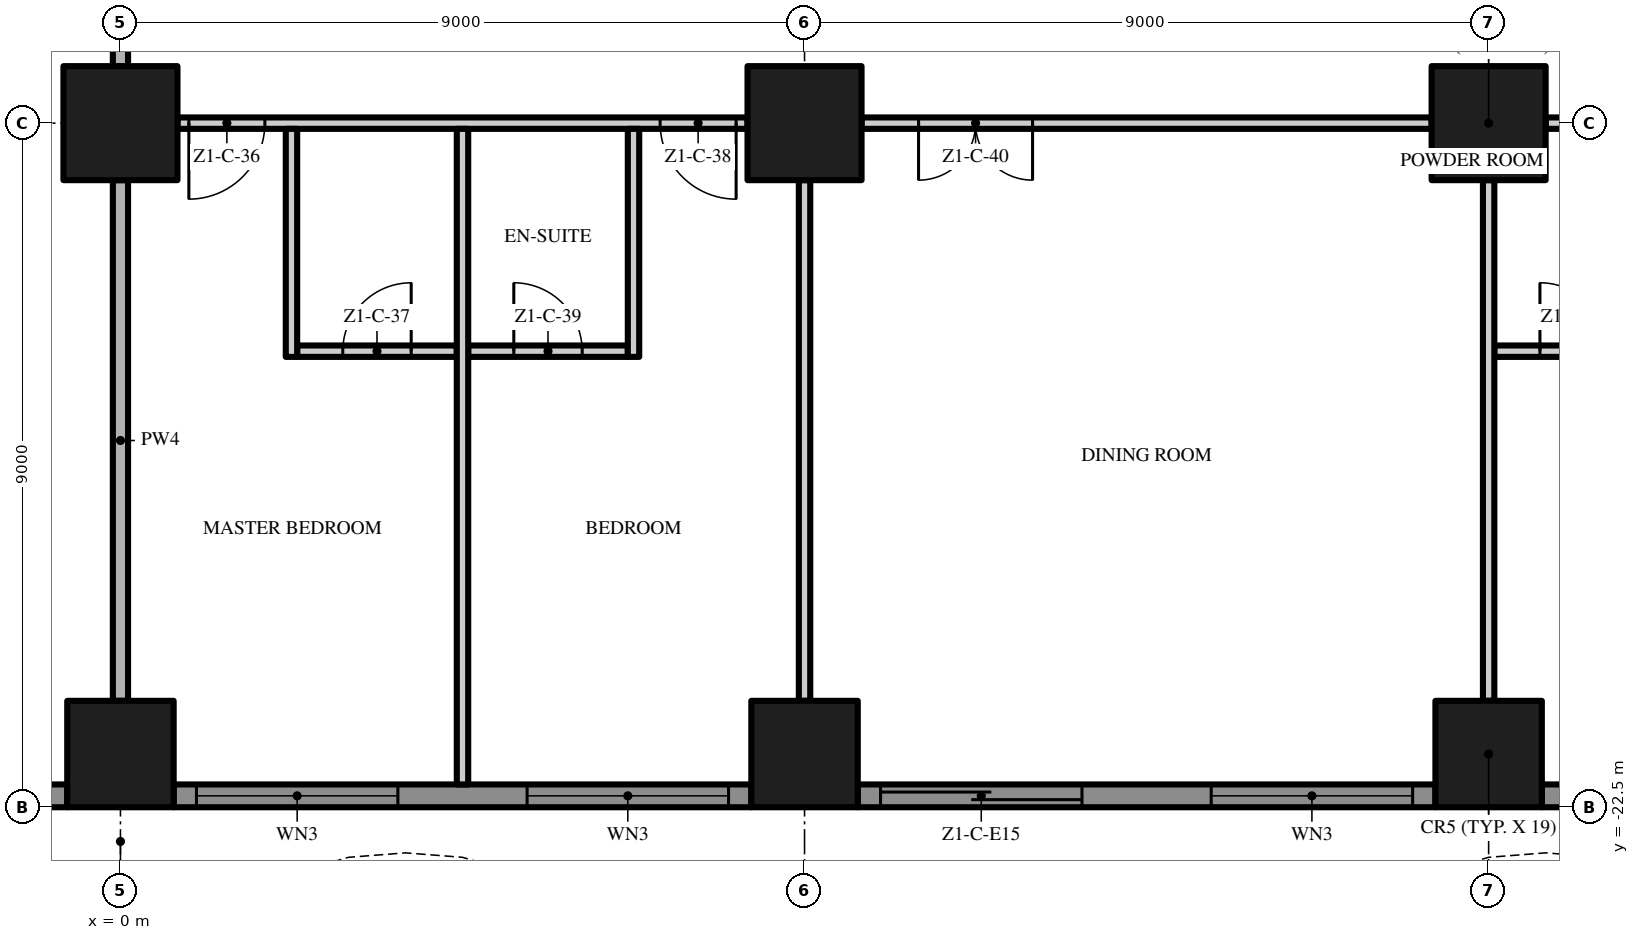
"""IFC4 building model, lengths in metres.
Left out: names, types, materials, properties, quantities, classifications, styles, units other than length and angle.
Written with IfcOpenShell. Run it as: python <this file> out.ifc"""

import sys

from ifc_helpers import new_model, si_unit, direction, frame, frame_2d, origin, origin_2d, place, context, subcontext, project, spatial, polyline, rectangle, outline, extrude, element, fill, save


model = new_model("IFC4")
c1 = context("Model", 3, precision=1e-05, world=origin(), true_north=direction((0.0, 1.0)))
c2 = subcontext(c1, "Body", "Model", "MODEL_VIEW")
j1 = project(units=[si_unit("LENGTHUNIT", "METRE"), si_unit("PLANEANGLEUNIT", "RADIAN")], contexts=[c1])
p1 = place(None, origin())
s1 = spatial("IfcSite", under=j1, at=p1, CompositionType="ELEMENT")
p2 = place(p1, origin())
s2 = spatial("IfcBuilding", under=s1, at=p2, CompositionType="ELEMENT")
p3 = place(p2, frame((0.0, 0.0, 45.4)))
s3 = spatial("IfcBuildingStorey", under=s2, at=p3, CompositionType="ELEMENT", Elevation=45.4)
p4 = place(p3, frame((0.0, -13.5, 0.0), z_axis=(0.0, 0.0, 1.0), x_axis=(1.0, 0.0, 0.0)))
e1 = element("IfcColumn", 1, at=p4, inside=s3, PredefinedType="COLUMN", context=c2, shape_type="SweptSolid", body=[
    extrude(rectangle(XDim=1.5, YDim=1.5, at=origin_2d()), origin(), (0.0, 0.0, 1.0), 3.5),
])
p5 = place(p3, frame((0.0, -21.8, 0.0), z_axis=(0.0, 0.0, 1.0), x_axis=(1.0, 0.0, 0.0)))
e2 = element("IfcColumn", 2, at=p5, inside=s3, PredefinedType="COLUMN", context=c2, shape_type="SweptSolid", body=[
    extrude(rectangle(XDim=1.4, YDim=1.4, at=origin_2d()), origin(), (0.0, 0.0, 1.0), 3.5),
])
p6 = place(p3, frame((18.0, -13.5, 0.0), z_axis=(0.0, 0.0, 1.0), x_axis=(1.0, 0.0, 0.0)))
e3 = element("IfcColumn", 3, at=p6, inside=s3, PredefinedType="COLUMN", context=c2, shape_type="SweptSolid", body=[
    extrude(rectangle(XDim=1.5, YDim=1.5, at=origin_2d()), origin(), (0.0, 0.0, 1.0), 3.5),
])
p7 = place(p3, frame((18.0, -21.8, 0.0), z_axis=(0.0, 0.0, 1.0), x_axis=(1.0, 0.0, 0.0)))
e4 = element("IfcColumn", 4, at=p7, inside=s3, PredefinedType="COLUMN", context=c2, shape_type="SweptSolid", body=[
    extrude(rectangle(XDim=1.4, YDim=1.4, at=origin_2d()), origin(), (0.0, 0.0, 1.0), 3.5),
])
p8 = place(p3, frame((9.0, -13.5, 0.0), z_axis=(0.0, 0.0, 1.0), x_axis=(1.0, 0.0, 0.0)))
e5 = element("IfcColumn", 5, at=p8, inside=s3, PredefinedType="COLUMN", context=c2, shape_type="SweptSolid", body=[
    extrude(rectangle(XDim=1.5, YDim=1.5, at=origin_2d()), origin(), (0.0, 0.0, 1.0), 3.5),
])
p9 = place(p3, frame((9.0, -21.8, 0.0), z_axis=(0.0, 0.0, 1.0), x_axis=(1.0, 0.0, 0.0)))
e6 = element("IfcColumn", 6, at=p9, inside=s3, PredefinedType="COLUMN", context=c2, shape_type="SweptSolid", body=[
    extrude(rectangle(XDim=1.4, YDim=1.4, at=origin_2d()), origin(), (0.0, 0.0, 1.0), 3.5),
])
p10 = place(p3, frame((-0.7, -22.35, 0.0), z_axis=(0.0, 0.0, 1.0), x_axis=(-1.0, 0.0, 0.0)))
e7 = element("IfcWall", 7, at=p10, inside=s3, PredefinedType="SOLIDWALL", context=c2, shape_type="SweptSolid", body=[
    extrude(rectangle(XDim=7.6, YDim=0.3, at=frame_2d((3.8, 0.0))), origin(), (0.0, 0.0, 1.0), 3.5),
])
p11 = place(p10, frame((4.65, 0.0, 0.45)))
e8 = element("IfcOpeningElement", 8, at=p11, cuts=e7, PredefinedType="OPENING", context=c2, shape_type="SweptSolid", body=[
    extrude(rectangle(XDim=2.65, YDim=2.65, at=frame_2d((1.325, 1.325))), frame((0.0, 0.16, 0.0), z_axis=(0.0, -1.0, 0.0), x_axis=(1.0, 0.0, 0.0)), (0.0, 0.0, 1.0), 0.32),
])
p12 = place(p10, frame((0.3, 0.0, 0.0)))
e9 = element("IfcOpeningElement", 9, at=p12, cuts=e7, PredefinedType="OPENING", context=c2, shape_type="SweptSolid", body=[
    extrude(rectangle(XDim=2.65, YDim=2.4, at=frame_2d((1.325, 1.2))), frame((0.0, 0.16, 0.0), z_axis=(0.0, -1.0, 0.0), x_axis=(1.0, 0.0, 0.0)), (0.0, 0.0, 1.0), 0.32),
])
p13 = place(p3, frame((8.3, -22.35, 0.0), z_axis=(0.0, 0.0, 1.0), x_axis=(-1.0, 0.0, 0.0)))
e10 = element("IfcWall", 10, at=p13, inside=s3, PredefinedType="SOLIDWALL", context=c2, shape_type="SweptSolid", body=[
    extrude(rectangle(XDim=7.6, YDim=0.3, at=frame_2d((3.8, 0.0))), origin(), (0.0, 0.0, 1.0), 3.5),
])
p14 = place(p13, frame((4.65, 0.0, 0.45)))
e11 = element("IfcOpeningElement", 11, at=p14, cuts=e10, PredefinedType="OPENING", context=c2, shape_type="SweptSolid", body=[
    extrude(rectangle(XDim=2.65, YDim=2.65, at=frame_2d((1.325, 1.325))), frame((0.0, 0.16, 0.0), z_axis=(0.0, -1.0, 0.0), x_axis=(1.0, 0.0, 0.0)), (0.0, 0.0, 1.0), 0.32),
])
p15 = place(p13, frame((0.3, 0.0, 0.45)))
e12 = element("IfcOpeningElement", 12, at=p15, cuts=e10, PredefinedType="OPENING", context=c2, shape_type="SweptSolid", body=[
    extrude(rectangle(XDim=2.65, YDim=2.65, at=frame_2d((1.325, 1.325))), frame((0.0, 0.16, 0.0), z_axis=(0.0, -1.0, 0.0), x_axis=(1.0, 0.0, 0.0)), (0.0, 0.0, 1.0), 0.32),
])
p16 = place(p3, frame((17.3, -22.35, 0.0), z_axis=(0.0, 0.0, 1.0), x_axis=(-1.0, 0.0, 0.0)))
e13 = element("IfcWall", 13, at=p16, inside=s3, PredefinedType="SOLIDWALL", context=c2, shape_type="SweptSolid", body=[
    extrude(rectangle(XDim=7.6, YDim=0.3, at=frame_2d((3.8, 0.0))), origin(), (0.0, 0.0, 1.0), 3.5),
])
p17 = place(p16, frame((4.65, 0.0, 0.0)))
e14 = element("IfcOpeningElement", 14, at=p17, cuts=e13, PredefinedType="OPENING", context=c2, shape_type="SweptSolid", body=[
    extrude(rectangle(XDim=2.65, YDim=2.4, at=frame_2d((1.325, 1.2))), frame((0.0, 0.16, 0.0), z_axis=(0.0, -1.0, 0.0), x_axis=(1.0, 0.0, 0.0)), (0.0, 0.0, 1.0), 0.32),
])
p18 = place(p16, frame((0.3, 0.0, 0.45)))
e15 = element("IfcOpeningElement", 15, at=p18, cuts=e13, PredefinedType="OPENING", context=c2, shape_type="SweptSolid", body=[
    extrude(rectangle(XDim=2.65, YDim=2.65, at=frame_2d((1.325, 1.325))), frame((0.0, 0.16, 0.0), z_axis=(0.0, -1.0, 0.0), x_axis=(1.0, 0.0, 0.0)), (0.0, 0.0, 1.0), 0.32),
])
p19 = place(p3, frame((22.5, -22.35, 0.0), z_axis=(0.0, 0.0, 1.0), x_axis=(-1.0, 0.0, 0.0)))
e16 = element("IfcWall", 16, at=p19, inside=s3, PredefinedType="SOLIDWALL", context=c2, shape_type="SweptSolid", body=[
    extrude(rectangle(XDim=3.8, YDim=0.3, at=frame_2d((1.9, 0.0))), origin(), (0.0, 0.0, 1.0), 3.5),
])
p20 = place(p19, frame((0.85, 0.0, 0.45)))
e17 = element("IfcOpeningElement", 17, at=p20, cuts=e16, PredefinedType="OPENING", context=c2, shape_type="SweptSolid", body=[
    extrude(rectangle(XDim=2.65, YDim=2.65, at=frame_2d((1.325, 1.325))), frame((0.0, 0.16, 0.0), z_axis=(0.0, -1.0, 0.0), x_axis=(1.0, 0.0, 0.0)), (0.0, 0.0, 1.0), 0.32),
])
p21 = place(p3, origin())
e18 = element("IfcWall", 18, at=p21, inside=s3, PredefinedType="USERDEFINED", context=c2, shape_type="SweptSolid", body=[
    extrude(outline(polyline([(-22.5, -24.3), (-21.0, -25.005), (-19.5, -25.441), (-18.75, -25.5), (-18.0, -25.441), (-16.5, -25.005), (-15.0, -24.3), (-13.5, -23.595), (-12.0, -23.159), (-11.25, -23.1), (-10.5, -23.159), (-9.0, -23.595), (-7.5, -24.3), (-6.0, -25.005), (-4.5, -25.441), (-3.75, -25.5), (-3.0, -25.441), (-1.5, -25.005), (0.0, -24.3), (1.5, -23.595), (3.0, -23.159), (3.75, -23.1), (4.5, -23.159), (6.0, -23.595), (7.5, -24.3), (9.0, -25.005), (10.5, -25.441), (11.25, -25.5), (12.0, -25.441), (13.5, -25.005), (15.0, -24.3), (16.5, -23.595), (18.0, -23.159), (18.75, -23.1), (19.5, -23.159), (21.0, -23.595), (22.5, -24.3), (22.606, -24.074), (21.089, -23.36), (19.545, -22.911), (18.75, -22.849), (17.955, -22.911), (16.411, -23.36), (14.894, -24.074), (13.411, -24.771), (11.955, -25.194), (11.25, -25.249), (10.545, -25.194), (9.089, -24.771), (7.606, -24.074), (6.089, -23.36), (4.545, -22.911), (3.75, -22.849), (2.955, -22.911), (1.411, -23.36), (-0.106, -24.074), (-1.589, -24.771), (-3.045, -25.194), (-3.75, -25.249), (-4.455, -25.194), (-5.911, -24.771), (-7.394, -24.074), (-8.911, -23.36), (-10.455, -22.911), (-11.25, -22.849), (-12.045, -22.911), (-13.589, -23.36), (-15.106, -24.074), (-16.589, -24.771), (-18.045, -25.194), (-18.75, -25.249), (-19.455, -25.194), (-20.911, -24.771), (-22.394, -24.074), (-22.5, -24.3)])), origin(), (0.0, 0.0, 1.0), 0.9),
])
p22 = place(p3, frame((2.325, -16.5, 0.0), z_axis=(0.0, 0.0, 1.0), x_axis=(1.0, 0.0, 0.0)))
e19 = element("IfcWall", 19, at=p22, inside=s3, PredefinedType="PARTITIONING", context=c2, shape_type="SweptSolid", body=[
    extrude(rectangle(XDim=2.1, YDim=0.15, at=frame_2d((1.05, 0.0))), origin(), (0.0, 0.0, 1.0), 3.5),
])
p23 = place(p22, frame((0.6, 0.0, 0.0)))
e20 = element("IfcOpeningElement", 20, at=p23, cuts=e19, PredefinedType="OPENING", context=c2, shape_type="SweptSolid", body=[
    extrude(rectangle(XDim=0.9, YDim=2.1, at=frame_2d((0.45, 1.05))), frame((0.0, 0.085, 0.0), z_axis=(0.0, -1.0, 0.0), x_axis=(1.0, 0.0, 0.0)), (0.0, 0.0, 1.0), 0.17),
])
p24 = place(p3, frame((4.575, -16.5, 0.0), z_axis=(0.0, 0.0, 1.0), x_axis=(1.0, 0.0, 0.0)))
e21 = element("IfcWall", 21, at=p24, inside=s3, PredefinedType="PARTITIONING", context=c2, shape_type="SweptSolid", body=[
    extrude(rectangle(XDim=2.1, YDim=0.15, at=frame_2d((1.05, 0.0))), origin(), (0.0, 0.0, 1.0), 3.5),
])
p25 = place(p24, frame((0.6, 0.0, 0.0)))
e22 = element("IfcOpeningElement", 22, at=p25, cuts=e21, PredefinedType="OPENING", context=c2, shape_type="SweptSolid", body=[
    extrude(rectangle(XDim=0.9, YDim=2.1, at=frame_2d((0.45, 1.05))), frame((0.0, 0.085, 0.0), z_axis=(0.0, -1.0, 0.0), x_axis=(1.0, 0.0, 0.0)), (0.0, 0.0, 1.0), 0.17),
])
p26 = place(p3, frame((18.075, -16.5, 0.0), z_axis=(0.0, 0.0, 1.0), x_axis=(1.0, 0.0, 0.0)))
e23 = element("IfcWall", 23, at=p26, inside=s3, PredefinedType="PARTITIONING", context=c2, shape_type="SweptSolid", body=[
    extrude(rectangle(XDim=2.1, YDim=0.15, at=frame_2d((1.05, 0.0))), origin(), (0.0, 0.0, 1.0), 3.5),
])
p27 = place(p26, frame((0.6, 0.0, 0.0)))
e24 = element("IfcOpeningElement", 24, at=p27, cuts=e23, PredefinedType="OPENING", context=c2, shape_type="SweptSolid", body=[
    extrude(rectangle(XDim=0.9, YDim=2.1, at=frame_2d((0.45, 1.05))), frame((0.0, 0.085, 0.0), z_axis=(0.0, -1.0, 0.0), x_axis=(1.0, 0.0, 0.0)), (0.0, 0.0, 1.0), 0.17),
])
p28 = place(p3, frame((8.25, -13.5, 0.0), z_axis=(0.0, 0.0, 1.0), x_axis=(-1.0, 0.0, 0.0)))
e25 = element("IfcWall", 25, at=p28, inside=s3, PredefinedType="PARTITIONING", context=c2, shape_type="SweptSolid", body=[
    extrude(rectangle(XDim=7.5, YDim=0.15, at=frame_2d((3.75, 0.0))), origin(), (0.0, 0.0, 1.0), 3.5),
])
p29 = place(p28, frame((6.35, 0.0, 0.0)))
e26 = element("IfcOpeningElement", 26, at=p29, cuts=e25, PredefinedType="OPENING", context=c2, shape_type="SweptSolid", body=[
    extrude(rectangle(XDim=1.0, YDim=2.4, at=frame_2d((0.5, 1.2))), frame((0.0, 0.085, 0.0), z_axis=(0.0, -1.0, 0.0), x_axis=(1.0, 0.0, 0.0)), (0.0, 0.0, 1.0), 0.17),
])
p30 = place(p28, frame((0.15, 0.0, 0.0)))
e27 = element("IfcOpeningElement", 27, at=p30, cuts=e25, PredefinedType="OPENING", context=c2, shape_type="SweptSolid", body=[
    extrude(rectangle(XDim=1.0, YDim=2.4, at=frame_2d((0.5, 1.2))), frame((0.0, 0.085, 0.0), z_axis=(0.0, -1.0, 0.0), x_axis=(1.0, 0.0, 0.0)), (0.0, 0.0, 1.0), 0.17),
])
p31 = place(p3, frame((17.25, -13.5, 0.0), z_axis=(0.0, 0.0, 1.0), x_axis=(-1.0, 0.0, 0.0)))
e28 = element("IfcWall", 28, at=p31, inside=s3, PredefinedType="PARTITIONING", context=c2, shape_type="SweptSolid", body=[
    extrude(rectangle(XDim=7.5, YDim=0.15, at=frame_2d((3.75, 0.0))), origin(), (0.0, 0.0, 1.0), 3.5),
])
p32 = place(p31, frame((5.25, 0.0, 0.0)))
e29 = element("IfcOpeningElement", 29, at=p32, cuts=e28, PredefinedType="OPENING", context=c2, shape_type="SweptSolid", body=[
    extrude(rectangle(XDim=1.5, YDim=2.4, at=frame_2d((0.75, 1.2))), frame((0.0, 0.085, 0.0), z_axis=(0.0, -1.0, 0.0), x_axis=(1.0, 0.0, 0.0)), (0.0, 0.0, 1.0), 0.17),
])
p33 = place(p3, frame((25.6, -13.5, 0.0), z_axis=(0.0, 0.0, 1.0), x_axis=(-1.0, 0.0, 0.0)))
e30 = element("IfcWall", 30, at=p33, inside=s3, PredefinedType="PARTITIONING", context=c2, shape_type="SweptSolid", body=[
    extrude(rectangle(XDim=6.85, YDim=0.15, at=frame_2d((3.425, 0.0))), origin(), (0.0, 0.0, 1.0), 3.5),
])
p34 = place(p33, frame((1.1, 0.0, 0.0)))
e31 = element("IfcOpeningElement", 31, at=p34, cuts=e30, PredefinedType="OPENING", context=c2, shape_type="SweptSolid", body=[
    extrude(rectangle(XDim=1.8, YDim=2.4, at=frame_2d((0.9, 1.2))), frame((0.0, 0.085, 0.0), z_axis=(0.0, -1.0, 0.0), x_axis=(1.0, 0.0, 0.0)), (0.0, 0.0, 1.0), 0.17),
])
p35 = place(p3, frame((0.0, -21.1, 0.0), z_axis=(0.0, 0.0, 1.0), x_axis=(0.0, 1.0, 0.0)))
e32 = element("IfcWall", 32, at=p35, inside=s3, PredefinedType="PARTITIONING", context=c2, shape_type="SweptSolid", body=[
    extrude(rectangle(XDim=6.85, YDim=0.2, at=frame_2d((3.425, 0.0))), origin(), (0.0, 0.0, 1.0), 3.5),
])
p36 = place(p3, frame((0.0, -12.75, 0.0), z_axis=(0.0, 0.0, 1.0), x_axis=(0.0, 1.0, 0.0)))
e33 = element("IfcWall", 33, at=p36, inside=s3, PredefinedType="PARTITIONING", context=c2, shape_type="SweptSolid", body=[
    extrude(rectangle(XDim=7.5, YDim=0.2, at=frame_2d((3.75, 0.0))), origin(), (0.0, 0.0, 1.0), 3.5),
])
p37 = place(p3, frame((2.25, -16.575, 0.0), z_axis=(0.0, 0.0, 1.0), x_axis=(0.0, 1.0, 0.0)))
e34 = element("IfcWall", 34, at=p37, inside=s3, PredefinedType="PARTITIONING", context=c2, shape_type="SweptSolid", body=[
    extrude(rectangle(XDim=3.0, YDim=0.15, at=frame_2d((1.5, 0.0))), origin(), (0.0, 0.0, 1.0), 3.5),
])
p38 = place(p3, frame((4.5, -22.2, 0.0), z_axis=(0.0, 0.0, 1.0), x_axis=(0.0, 1.0, 0.0)))
e35 = element("IfcWall", 35, at=p38, inside=s3, PredefinedType="PARTITIONING", context=c2, shape_type="SweptSolid", body=[
    extrude(rectangle(XDim=8.625, YDim=0.15, at=frame_2d((4.312, 0.0))), origin(), (0.0, 0.0, 1.0), 3.5),
])
p39 = place(p3, frame((6.75, -16.575, 0.0), z_axis=(0.0, 0.0, 1.0), x_axis=(0.0, 1.0, 0.0)))
e36 = element("IfcWall", 36, at=p39, inside=s3, PredefinedType="PARTITIONING", context=c2, shape_type="SweptSolid", body=[
    extrude(rectangle(XDim=3.0, YDim=0.15, at=frame_2d((1.5, 0.0))), origin(), (0.0, 0.0, 1.0), 3.5),
])
for number, where, z_axis, x_axis in (
    (37, (9.0, -21.1, 0.0), (0.0, 0.0, 1.0), (0.0, 1.0, 0.0)),
    (38, (18.0, -21.1, 0.0), (0.0, 0.0, 1.0), (0.0, 1.0, 0.0)),
):
    element("IfcWall", number, at=place(p3, frame(where, z_axis=z_axis, x_axis=x_axis)), inside=s3, PredefinedType="PARTITIONING", context=c2, shape_type="SweptSolid", body=[
        extrude(rectangle(XDim=6.85, YDim=0.15, at=frame_2d((3.425, 0.0))), origin(), (0.0, 0.0, 1.0), 3.5),
    ])
p40 = place(p14, origin())
e39 = element("IfcWindow", 39, at=p40, inside=s3, PartitioningType="SINGLE_PANEL", PredefinedType="WINDOW", context=c2, shape_type="SweptSolid", body=[
    extrude(rectangle(XDim=2.65, YDim=2.65, at=frame_2d((1.325, 1.325))), frame((0.0, 0.03, 0.0), z_axis=(0.0, -1.0, 0.0), x_axis=(1.0, 0.0, 0.0)), (0.0, 0.0, 1.0), 0.06),
])
fill(e11, e39)
p41 = place(p15, origin())
e40 = element("IfcWindow", 40, at=p41, inside=s3, PartitioningType="SINGLE_PANEL", PredefinedType="WINDOW", context=c2, shape_type="SweptSolid", body=[
    extrude(rectangle(XDim=2.65, YDim=2.65, at=frame_2d((1.325, 1.325))), frame((0.0, 0.03, 0.0), z_axis=(0.0, -1.0, 0.0), x_axis=(1.0, 0.0, 0.0)), (0.0, 0.0, 1.0), 0.06),
])
fill(e12, e40)
p42 = place(p17, origin())
e41 = element("IfcDoor", 41, at=p42, inside=s3, OperationType="SINGLE_SWING_LEFT", PredefinedType="DOOR", context=c2, shape_type="SweptSolid", body=[
    extrude(rectangle(XDim=2.65, YDim=2.4, at=frame_2d((1.325, 1.2))), frame((0.0, 0.025, 0.0), z_axis=(0.0, -1.0, 0.0), x_axis=(1.0, 0.0, 0.0)), (0.0, 0.0, 1.0), 0.05),
])
fill(e14, e41)
p43 = place(p18, origin())
e42 = element("IfcWindow", 42, at=p43, inside=s3, PartitioningType="SINGLE_PANEL", PredefinedType="WINDOW", context=c2, shape_type="SweptSolid", body=[
    extrude(rectangle(XDim=2.65, YDim=2.65, at=frame_2d((1.325, 1.325))), frame((0.0, 0.03, 0.0), z_axis=(0.0, -1.0, 0.0), x_axis=(1.0, 0.0, 0.0)), (0.0, 0.0, 1.0), 0.06),
])
fill(e15, e42)
p44 = place(p29, origin())
e43 = element("IfcDoor", 43, at=p44, inside=s3, OperationType="SINGLE_SWING_RIGHT", PredefinedType="DOOR", context=c2, shape_type="SweptSolid", body=[
    extrude(rectangle(XDim=1.0, YDim=2.4, at=frame_2d((0.5, 1.2))), frame((0.0, 0.025, 0.0), z_axis=(0.0, -1.0, 0.0), x_axis=(1.0, 0.0, 0.0)), (0.0, 0.0, 1.0), 0.05),
])
fill(e26, e43)
p45 = place(p23, origin())
e44 = element("IfcDoor", 44, at=p45, inside=s3, OperationType="SINGLE_SWING_RIGHT", PredefinedType="DOOR", context=c2, shape_type="SweptSolid", body=[
    extrude(rectangle(XDim=0.9, YDim=2.1, at=frame_2d((0.45, 1.05))), frame((0.0, 0.025, 0.0), z_axis=(0.0, -1.0, 0.0), x_axis=(1.0, 0.0, 0.0)), (0.0, 0.0, 1.0), 0.05),
])
fill(e20, e44)
p46 = place(p30, origin())
e45 = element("IfcDoor", 45, at=p46, inside=s3, OperationType="SINGLE_SWING_LEFT", PredefinedType="DOOR", context=c2, shape_type="SweptSolid", body=[
    extrude(rectangle(XDim=1.0, YDim=2.4, at=frame_2d((0.5, 1.2))), frame((0.0, 0.025, 0.0), z_axis=(0.0, -1.0, 0.0), x_axis=(1.0, 0.0, 0.0)), (0.0, 0.0, 1.0), 0.05),
])
fill(e27, e45)
p47 = place(p25, origin())
e46 = element("IfcDoor", 46, at=p47, inside=s3, OperationType="SINGLE_SWING_LEFT", PredefinedType="DOOR", context=c2, shape_type="SweptSolid", body=[
    extrude(rectangle(XDim=0.9, YDim=2.1, at=frame_2d((0.45, 1.05))), frame((0.0, 0.025, 0.0), z_axis=(0.0, -1.0, 0.0), x_axis=(1.0, 0.0, 0.0)), (0.0, 0.0, 1.0), 0.05),
])
fill(e22, e46)
p48 = place(p32, origin())
e47 = element("IfcDoor", 47, at=p48, inside=s3, OperationType="DOUBLE_DOOR_SINGLE_SWING", PredefinedType="DOOR", context=c2, shape_type="SweptSolid", body=[
    extrude(rectangle(XDim=1.5, YDim=2.4, at=frame_2d((0.75, 1.2))), frame((0.0, 0.025, 0.0), z_axis=(0.0, -1.0, 0.0), x_axis=(1.0, 0.0, 0.0)), (0.0, 0.0, 1.0), 0.05),
])
fill(e29, e47)
p49 = place(p27, origin())
e48 = element("IfcDoor", 48, at=p49, inside=s3, OperationType="SINGLE_SWING_LEFT", PredefinedType="DOOR", context=c2, shape_type="SweptSolid", body=[
    extrude(rectangle(XDim=0.9, YDim=2.1, at=frame_2d((0.45, 1.05))), frame((0.0, 0.025, 0.0), z_axis=(0.0, -1.0, 0.0), x_axis=(1.0, 0.0, 0.0)), (0.0, 0.0, 1.0), 0.05),
])
fill(e24, e48)
save(model, sys.argv[1])
